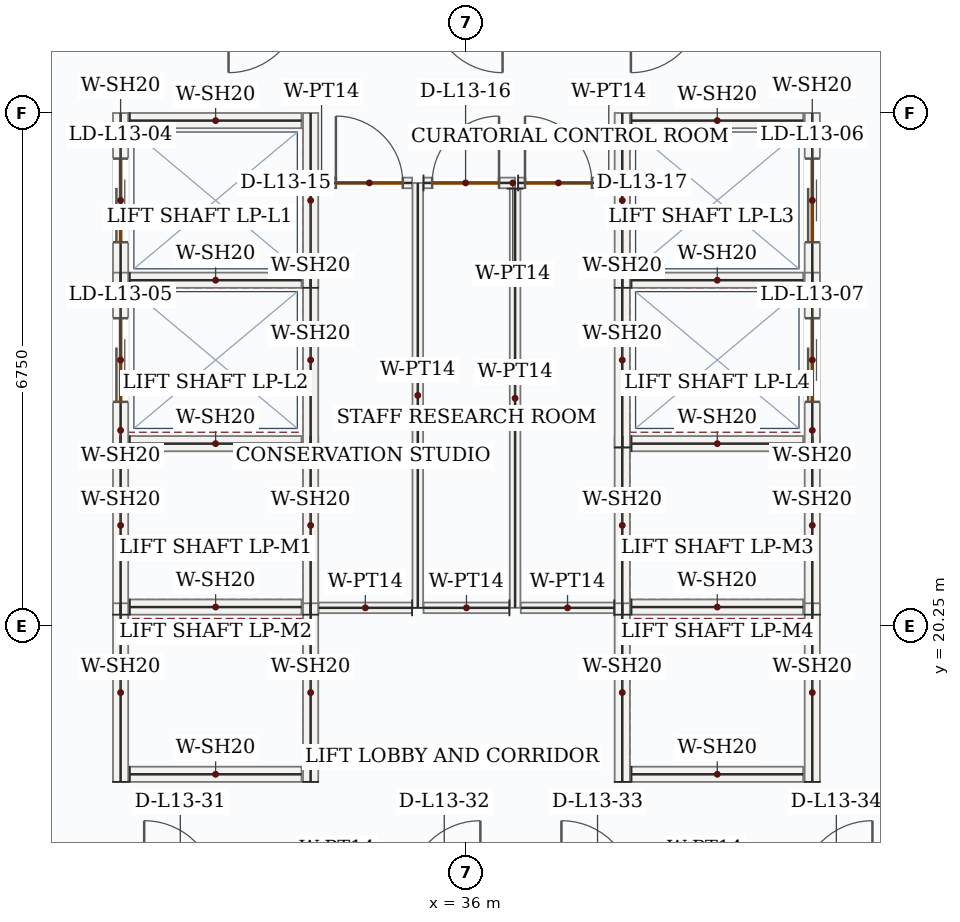
"""IFC4 building model, lengths in metres.
Left out: names, types, materials, properties, quantities, classifications, styles, units other than length and angle.
Written with IfcOpenShell. Run it as: python <this file> out.ifc"""

import sys

from ifc_helpers import new_model, si_unit, direction, frame, frame_2d, origin, place, context, subcontext, project, spatial, rectangle, extrude, source, transform, mapped, element, fill, save


model = new_model("IFC4")
c1 = context("Model", 3, precision=1e-05, world=origin(), true_north=direction((0.0, 1.0)))
c2 = subcontext(c1, "Body", "Model", "MODEL_VIEW")
j1 = project(units=[si_unit("LENGTHUNIT", "METRE"), si_unit("PLANEANGLEUNIT", "RADIAN")], contexts=[c1])
p1 = place(None, origin())
s1 = spatial("IfcSite", under=j1, at=p1, CompositionType="ELEMENT")
p2 = place(p1, origin())
s2 = spatial("IfcBuilding", under=s1, at=p2, CompositionType="ELEMENT")
p3 = place(p2, frame((0.0, 0.0, 62.7)))
s3 = spatial("IfcBuildingStorey", under=s2, at=p3, CompositionType="ELEMENT", Elevation=62.7)
m1 = source(origin(), c2, "Body", "SweptSolid", [
    extrude(rectangle(XDim=2.35, YDim=0.2, at=frame_2d((1.175, 0.0))), origin(), (0.0, 0.0, 1.0), 3.95),
])
for number, where, z_axis, x_axis in (
    (1, (31.45, 20.4, 0.0), (0.0, 0.0, 1.0), (0.0, 1.0, 0.0)),
    (2, (33.95, 20.4, 0.0), (0.0, 0.0, 1.0), (0.0, 1.0, 0.0)),
):
    element("IfcWall", number, at=place(p3, frame(where, z_axis=z_axis, x_axis=x_axis)), inside=s3, PredefinedType="SOLIDWALL", context=c2, shape_type="MappedRepresentation", body=[
        mapped(m1, transform((0.0, 0.0, 0.0), x_axis=(1.0, 0.0, 0.0), y_axis=(0.0, 1.0, 0.0), z_axis=(0.0, 0.0, 1.0), scale=1.0)),
    ])
m2 = source(origin(), c2, "Body", "SweptSolid", [
    extrude(rectangle(XDim=2.26, YDim=0.2, at=frame_2d((1.13, 0.0))), origin(), (0.0, 0.0, 1.0), 3.95),
])
for number, where, z_axis, x_axis in (
    (3, (31.57, 20.5, 0.0), (0.0, 0.0, 1.0), (1.0, 0.0, 0.0)),
    (4, (31.57, 22.65, 0.0), (0.0, 0.0, 1.0), (1.0, 0.0, 0.0)),
):
    element("IfcWall", number, at=place(p3, frame(where, z_axis=z_axis, x_axis=x_axis)), inside=s3, PredefinedType="SOLIDWALL", context=c2, shape_type="MappedRepresentation", body=[
        mapped(m2, transform((0.0, 0.0, 0.0), x_axis=(1.0, 0.0, 0.0), y_axis=(0.0, 1.0, 0.0), z_axis=(0.0, 0.0, 1.0), scale=1.0)),
    ])
for number, where, z_axis, x_axis in (
    (5, (31.45, 18.2, 0.0), (0.0, 0.0, 1.0), (0.0, 1.0, 0.0)),
    (6, (33.95, 18.2, 0.0), (0.0, 0.0, 1.0), (0.0, 1.0, 0.0)),
):
    element("IfcWall", number, at=place(p3, frame(where, z_axis=z_axis, x_axis=x_axis)), inside=s3, PredefinedType="SOLIDWALL", context=c2, shape_type="MappedRepresentation", body=[
        mapped(m1, transform((0.0, 0.0, 0.0), x_axis=(1.0, 0.0, 0.0), y_axis=(0.0, 1.0, 0.0), z_axis=(0.0, 0.0, 1.0), scale=1.0)),
    ])
p4 = place(p3, frame((31.57, 18.3, 0.0), z_axis=(0.0, 0.0, 1.0), x_axis=(1.0, 0.0, 0.0)))
e7 = element("IfcWall", 7, at=p4, inside=s3, PredefinedType="SOLIDWALL", context=c2, shape_type="MappedRepresentation", body=[
    mapped(m2, transform((0.0, 0.0, 0.0), x_axis=(1.0, 0.0, 0.0), y_axis=(0.0, 1.0, 0.0), z_axis=(0.0, 0.0, 1.0), scale=1.0)),
])
for number, where, z_axis, x_axis in (
    (8, (38.05, 20.4, 0.0), (0.0, 0.0, 1.0), (0.0, 1.0, 0.0)),
    (9, (40.55, 20.4, 0.0), (0.0, 0.0, 1.0), (0.0, 1.0, 0.0)),
):
    element("IfcWall", number, at=place(p3, frame(where, z_axis=z_axis, x_axis=x_axis)), inside=s3, PredefinedType="SOLIDWALL", context=c2, shape_type="MappedRepresentation", body=[
        mapped(m1, transform((0.0, 0.0, 0.0), x_axis=(1.0, 0.0, 0.0), y_axis=(0.0, 1.0, 0.0), z_axis=(0.0, 0.0, 1.0), scale=1.0)),
    ])
for number, where, z_axis, x_axis in (
    (10, (38.17, 20.5, 0.0), (0.0, 0.0, 1.0), (1.0, 0.0, 0.0)),
    (11, (38.17, 22.65, 0.0), (0.0, 0.0, 1.0), (1.0, 0.0, 0.0)),
):
    element("IfcWall", number, at=place(p3, frame(where, z_axis=z_axis, x_axis=x_axis)), inside=s3, PredefinedType="SOLIDWALL", context=c2, shape_type="MappedRepresentation", body=[
        mapped(m2, transform((0.0, 0.0, 0.0), x_axis=(1.0, 0.0, 0.0), y_axis=(0.0, 1.0, 0.0), z_axis=(0.0, 0.0, 1.0), scale=1.0)),
    ])
for number, where, z_axis, x_axis in (
    (12, (38.05, 18.2, 0.0), (0.0, 0.0, 1.0), (0.0, 1.0, 0.0)),
    (13, (40.55, 18.2, 0.0), (0.0, 0.0, 1.0), (0.0, 1.0, 0.0)),
):
    element("IfcWall", number, at=place(p3, frame(where, z_axis=z_axis, x_axis=x_axis)), inside=s3, PredefinedType="SOLIDWALL", context=c2, shape_type="MappedRepresentation", body=[
        mapped(m1, transform((0.0, 0.0, 0.0), x_axis=(1.0, 0.0, 0.0), y_axis=(0.0, 1.0, 0.0), z_axis=(0.0, 0.0, 1.0), scale=1.0)),
    ])
p5 = place(p3, frame((38.17, 18.3, 0.0), z_axis=(0.0, 0.0, 1.0), x_axis=(1.0, 0.0, 0.0)))
e14 = element("IfcWall", 14, at=p5, inside=s3, PredefinedType="SOLIDWALL", context=c2, shape_type="MappedRepresentation", body=[
    mapped(m2, transform((0.0, 0.0, 0.0), x_axis=(1.0, 0.0, 0.0), y_axis=(0.0, 1.0, 0.0), z_axis=(0.0, 0.0, 1.0), scale=1.0)),
])
p6 = place(p3, frame((31.45, 24.7, 0.0), z_axis=(0.0, 0.0, 1.0), x_axis=(0.0, 1.0, 0.0)))
e15 = element("IfcWall", 15, at=p6, inside=s3, PredefinedType="SOLIDWALL", context=c2, shape_type="SweptSolid", body=[
    extrude(rectangle(XDim=2.3, YDim=0.2, at=frame_2d((1.15, 0.0))), origin(), (0.0, 0.0, 1.0), 3.95),
])
p7 = place(p6, frame((0.6, 0.0, 0.0)))
e16 = element("IfcOpeningElement", 16, at=p7, cuts=e15, PredefinedType="OPENING", context=c2, shape_type="SweptSolid", body=[
    extrude(rectangle(XDim=1.1, YDim=2.15, at=frame_2d((0.55, 1.075))), frame((0.0, 0.11, 0.0), z_axis=(0.0, -1.0, 0.0), x_axis=(1.0, 0.0, 0.0)), (0.0, 0.0, 1.0), 0.22),
])
m3 = source(origin(), c2, "Body", "SweptSolid", [
    extrude(rectangle(XDim=2.3, YDim=0.2, at=frame_2d((1.15, 0.0))), origin(), (0.0, 0.0, 1.0), 3.95),
])
p8 = place(p3, frame((33.95, 24.7, 0.0), z_axis=(0.0, 0.0, 1.0), x_axis=(0.0, 1.0, 0.0)))
e17 = element("IfcWall", 17, at=p8, inside=s3, PredefinedType="SOLIDWALL", context=c2, shape_type="MappedRepresentation", body=[
    mapped(m3, transform((0.0, 0.0, 0.0), x_axis=(1.0, 0.0, 0.0), y_axis=(0.0, 1.0, 0.0), z_axis=(0.0, 0.0, 1.0), scale=1.0)),
])
for number, where, z_axis, x_axis in (
    (18, (31.57, 24.8, 0.0), (0.0, 0.0, 1.0), (1.0, 0.0, 0.0)),
    (19, (31.57, 26.9, 0.0), (0.0, 0.0, 1.0), (1.0, 0.0, 0.0)),
):
    element("IfcWall", number, at=place(p3, frame(where, z_axis=z_axis, x_axis=x_axis)), inside=s3, PredefinedType="SOLIDWALL", context=c2, shape_type="MappedRepresentation", body=[
        mapped(m2, transform((0.0, 0.0, 0.0), x_axis=(1.0, 0.0, 0.0), y_axis=(0.0, 1.0, 0.0), z_axis=(0.0, 0.0, 1.0), scale=1.0)),
    ])
p9 = place(p3, frame((31.45, 22.6, 0.0), z_axis=(0.0, 0.0, 1.0), x_axis=(0.0, 1.0, 0.0)))
e20 = element("IfcWall", 20, at=p9, inside=s3, PredefinedType="SOLIDWALL", context=c2, shape_type="SweptSolid", body=[
    extrude(rectangle(XDim=2.3, YDim=0.2, at=frame_2d((1.15, 0.0))), origin(), (0.0, 0.0, 1.0), 3.95),
])
p10 = place(p9, frame((0.6, 0.0, 0.0)))
e21 = element("IfcOpeningElement", 21, at=p10, cuts=e20, PredefinedType="OPENING", context=c2, shape_type="SweptSolid", body=[
    extrude(rectangle(XDim=1.1, YDim=2.15, at=frame_2d((0.55, 1.075))), frame((0.0, 0.11, 0.0), z_axis=(0.0, -1.0, 0.0), x_axis=(1.0, 0.0, 0.0)), (0.0, 0.0, 1.0), 0.22),
])
m4 = source(origin(), c2, "Body", "SweptSolid", [
    extrude(rectangle(XDim=2.3, YDim=0.2, at=frame_2d((1.15, 0.0))), origin(), (0.0, 0.0, 1.0), 3.95),
])
p11 = place(p3, frame((33.95, 22.6, 0.0), z_axis=(0.0, 0.0, 1.0), x_axis=(0.0, 1.0, 0.0)))
e22 = element("IfcWall", 22, at=p11, inside=s3, PredefinedType="SOLIDWALL", context=c2, shape_type="MappedRepresentation", body=[
    mapped(m4, transform((0.0, 0.0, 0.0), x_axis=(1.0, 0.0, 0.0), y_axis=(0.0, 1.0, 0.0), z_axis=(0.0, 0.0, 1.0), scale=1.0)),
])
p12 = place(p3, frame((38.05, 24.7, 0.0), z_axis=(0.0, 0.0, 1.0), x_axis=(0.0, 1.0, 0.0)))
e23 = element("IfcWall", 23, at=p12, inside=s3, PredefinedType="SOLIDWALL", context=c2, shape_type="MappedRepresentation", body=[
    mapped(m3, transform((0.0, 0.0, 0.0), x_axis=(1.0, 0.0, 0.0), y_axis=(0.0, 1.0, 0.0), z_axis=(0.0, 0.0, 1.0), scale=1.0)),
])
p13 = place(p3, frame((40.55, 24.7, 0.0), z_axis=(0.0, 0.0, 1.0), x_axis=(0.0, 1.0, 0.0)))
e24 = element("IfcWall", 24, at=p13, inside=s3, PredefinedType="SOLIDWALL", context=c2, shape_type="SweptSolid", body=[
    extrude(rectangle(XDim=2.3, YDim=0.2, at=frame_2d((1.15, 0.0))), origin(), (0.0, 0.0, 1.0), 3.95),
])
p14 = place(p13, frame((0.6, 0.0, 0.0)))
e25 = element("IfcOpeningElement", 25, at=p14, cuts=e24, PredefinedType="OPENING", context=c2, shape_type="SweptSolid", body=[
    extrude(rectangle(XDim=1.1, YDim=2.15, at=frame_2d((0.55, 1.075))), frame((0.0, 0.11, 0.0), z_axis=(0.0, -1.0, 0.0), x_axis=(1.0, 0.0, 0.0)), (0.0, 0.0, 1.0), 0.22),
])
for number, where, z_axis, x_axis in (
    (26, (38.17, 24.8, 0.0), (0.0, 0.0, 1.0), (1.0, 0.0, 0.0)),
    (27, (38.17, 26.9, 0.0), (0.0, 0.0, 1.0), (1.0, 0.0, 0.0)),
):
    element("IfcWall", number, at=place(p3, frame(where, z_axis=z_axis, x_axis=x_axis)), inside=s3, PredefinedType="SOLIDWALL", context=c2, shape_type="MappedRepresentation", body=[
        mapped(m2, transform((0.0, 0.0, 0.0), x_axis=(1.0, 0.0, 0.0), y_axis=(0.0, 1.0, 0.0), z_axis=(0.0, 0.0, 1.0), scale=1.0)),
    ])
p15 = place(p3, frame((38.05, 22.6, 0.0), z_axis=(0.0, 0.0, 1.0), x_axis=(0.0, 1.0, 0.0)))
e28 = element("IfcWall", 28, at=p15, inside=s3, PredefinedType="SOLIDWALL", context=c2, shape_type="MappedRepresentation", body=[
    mapped(m4, transform((0.0, 0.0, 0.0), x_axis=(1.0, 0.0, 0.0), y_axis=(0.0, 1.0, 0.0), z_axis=(0.0, 0.0, 1.0), scale=1.0)),
])
p16 = place(p3, frame((40.55, 22.6, 0.0), z_axis=(0.0, 0.0, 1.0), x_axis=(0.0, 1.0, 0.0)))
e29 = element("IfcWall", 29, at=p16, inside=s3, PredefinedType="SOLIDWALL", context=c2, shape_type="SweptSolid", body=[
    extrude(rectangle(XDim=2.3, YDim=0.2, at=frame_2d((1.15, 0.0))), origin(), (0.0, 0.0, 1.0), 3.95),
])
p17 = place(p16, frame((0.6, 0.0, 0.0)))
e30 = element("IfcOpeningElement", 30, at=p17, cuts=e29, PredefinedType="OPENING", context=c2, shape_type="SweptSolid", body=[
    extrude(rectangle(XDim=1.1, YDim=2.15, at=frame_2d((0.55, 1.075))), frame((0.0, 0.11, 0.0), z_axis=(0.0, -1.0, 0.0), x_axis=(1.0, 0.0, 0.0)), (0.0, 0.0, 1.0), 0.22),
])
m5 = source(origin(), c2, "Body", "SweptSolid", [
    extrude(rectangle(XDim=5.59, YDim=0.14, at=frame_2d((2.795, 0.0))), origin(), (0.0, 0.0, 1.0), 3.95),
])
p18 = place(p3, frame((35.36, 20.49, 0.0), z_axis=(0.0, 0.0, 1.0), x_axis=(0.0, 1.0, 0.0)))
e31 = element("IfcWall", 31, at=p18, inside=s3, PredefinedType="PARTITIONING", context=c2, shape_type="MappedRepresentation", body=[
    mapped(m5, transform((0.0, 0.0, 0.0), x_axis=(1.0, 0.0, 0.0), y_axis=(0.0, 1.0, 0.0), z_axis=(0.0, 0.0, 1.0), scale=1.0)),
])
p19 = place(p3, frame((35.435, 26.08, 0.0), z_axis=(0.0, 0.0, 1.0), x_axis=(1.0, 0.0, 0.0)))
e32 = element("IfcWall", 32, at=p19, inside=s3, PredefinedType="PARTITIONING", context=c2, shape_type="SweptSolid", body=[
    extrude(rectangle(XDim=1.205, YDim=0.14, at=frame_2d((0.603, 0.0))), origin(), (0.0, 0.0, 1.0), 3.95),
])
p20 = place(p19, frame((0.114, 0.0, 0.0)))
e33 = element("IfcOpeningElement", 33, at=p20, cuts=e32, PredefinedType="OPENING", context=c2, shape_type="SweptSolid", body=[
    extrude(rectangle(XDim=0.88, YDim=2.1, at=frame_2d((0.44, 1.05))), frame((0.0, 0.08, 0.0), z_axis=(0.0, -1.0, 0.0), x_axis=(1.0, 0.0, 0.0)), (0.0, 0.0, 1.0), 0.16),
])
m6 = source(origin(), c2, "Body", "SweptSolid", [
    extrude(rectangle(XDim=5.515, YDim=0.14, at=frame_2d((2.757, 0.0))), origin(), (0.0, 0.0, 1.0), 3.95),
])
p21 = place(p3, frame((36.64, 26.005, 0.0), z_axis=(0.0, 0.0, 1.0), x_axis=(0.0, -1.0, 0.0)))
e34 = element("IfcWall", 34, at=p21, inside=s3, PredefinedType="PARTITIONING", context=c2, shape_type="MappedRepresentation", body=[
    mapped(m6, transform((0.0, 0.0, 0.0), x_axis=(1.0, 0.0, 0.0), y_axis=(0.0, 1.0, 0.0), z_axis=(0.0, 0.0, 1.0), scale=1.0)),
])
m7 = source(origin(), c2, "Body", "SweptSolid", [
    extrude(rectangle(XDim=1.13, YDim=0.14, at=frame_2d((0.565, 0.0))), origin(), (0.0, 0.0, 1.0), 3.95),
])
p22 = place(p3, frame((36.565, 20.49, 0.0), z_axis=(0.0, 0.0, 1.0), x_axis=(-1.0, 0.0, 0.0)))
e35 = element("IfcWall", 35, at=p22, inside=s3, PredefinedType="PARTITIONING", context=c2, shape_type="MappedRepresentation", body=[
    mapped(m7, transform((0.0, 0.0, 0.0), x_axis=(1.0, 0.0, 0.0), y_axis=(0.0, 1.0, 0.0), z_axis=(0.0, 0.0, 1.0), scale=1.0)),
])
p23 = place(p3, frame((34.055, 26.08, 0.0), z_axis=(0.0, 0.0, 1.0), x_axis=(1.0, 0.0, 0.0)))
e36 = element("IfcWall", 36, at=p23, inside=s3, PredefinedType="PARTITIONING", context=c2, shape_type="SweptSolid", body=[
    extrude(rectangle(XDim=1.23, YDim=0.14, at=frame_2d((0.615, 0.0))), origin(), (0.0, 0.0, 1.0), 3.95),
])
p24 = place(p23, frame((0.228, 0.0, 0.0)))
e37 = element("IfcOpeningElement", 37, at=p24, cuts=e36, PredefinedType="OPENING", context=c2, shape_type="SweptSolid", body=[
    extrude(rectangle(XDim=0.88, YDim=2.1, at=frame_2d((0.44, 1.05))), frame((0.0, 0.08, 0.0), z_axis=(0.0, -1.0, 0.0), x_axis=(1.0, 0.0, 0.0)), (0.0, 0.0, 1.0), 0.16),
])
m8 = source(origin(), c2, "Body", "SweptSolid", [
    extrude(rectangle(XDim=1.23, YDim=0.14, at=frame_2d((0.615, 0.0))), origin(), (0.0, 0.0, 1.0), 3.95),
])
p25 = place(p3, frame((35.285, 20.49, 0.0), z_axis=(0.0, 0.0, 1.0), x_axis=(-1.0, 0.0, 0.0)))
e38 = element("IfcWall", 38, at=p25, inside=s3, PredefinedType="PARTITIONING", context=c2, shape_type="MappedRepresentation", body=[
    mapped(m8, transform((0.0, 0.0, 0.0), x_axis=(1.0, 0.0, 0.0), y_axis=(0.0, 1.0, 0.0), z_axis=(0.0, 0.0, 1.0), scale=1.0)),
])
p26 = place(p3, frame((36.68, 26.08, 0.0), z_axis=(0.0, 0.0, 1.0), x_axis=(1.0, 0.0, 0.0)))
e39 = element("IfcWall", 39, at=p26, inside=s3, PredefinedType="PARTITIONING", context=c2, shape_type="SweptSolid", body=[
    extrude(rectangle(XDim=1.265, YDim=0.14, at=frame_2d((0.633, 0.0))), origin(), (0.0, 0.0, 1.0), 3.95),
])
p27 = place(p26, frame((0.09, 0.0, 0.0)))
e40 = element("IfcOpeningElement", 40, at=p27, cuts=e39, PredefinedType="OPENING", context=c2, shape_type="SweptSolid", body=[
    extrude(rectangle(XDim=0.88, YDim=2.1, at=frame_2d((0.44, 1.05))), frame((0.0, 0.08, 0.0), z_axis=(0.0, -1.0, 0.0), x_axis=(1.0, 0.0, 0.0)), (0.0, 0.0, 1.0), 0.16),
])
p28 = place(p3, frame((37.945, 20.49, 0.0), z_axis=(0.0, 0.0, 1.0), x_axis=(-1.0, 0.0, 0.0)))
e41 = element("IfcWall", 41, at=p28, inside=s3, PredefinedType="PARTITIONING", context=c2, shape_type="MappedRepresentation", body=[
    mapped(m8, transform((0.0, 0.0, 0.0), x_axis=(1.0, 0.0, 0.0), y_axis=(0.0, 1.0, 0.0), z_axis=(0.0, 0.0, 1.0), scale=1.0)),
])
m9 = source(origin(), c2, "Body", "SweptSolid", [
    extrude(rectangle(XDim=1.1, YDim=2.15, at=frame_2d((0.55, 1.075))), frame((0.0, 0.025, 0.0), z_axis=(0.0, -1.0, 0.0), x_axis=(1.0, 0.0, 0.0)), (0.0, 0.0, 1.0), 0.05),
])
p29 = place(p7, origin())
e42 = element("IfcDoor", 42, at=p29, inside=s3, OperationType="DOUBLE_DOOR_SLIDING", PredefinedType="DOOR", context=c2, shape_type="MappedRepresentation", body=[
    mapped(m9, transform((0.0, 0.0, 0.0), x_axis=(1.0, 0.0, 0.0), y_axis=(0.0, 1.0, 0.0), z_axis=(0.0, 0.0, 1.0), scale=1.0)),
])
fill(e16, e42)
p30 = place(p10, origin())
e43 = element("IfcDoor", 43, at=p30, inside=s3, OperationType="DOUBLE_DOOR_SLIDING", PredefinedType="DOOR", context=c2, shape_type="MappedRepresentation", body=[
    mapped(m9, transform((0.0, 0.0, 0.0), x_axis=(1.0, 0.0, 0.0), y_axis=(0.0, 1.0, 0.0), z_axis=(0.0, 0.0, 1.0), scale=1.0)),
])
fill(e21, e43)
p31 = place(p14, origin())
e44 = element("IfcDoor", 44, at=p31, inside=s3, OperationType="DOUBLE_DOOR_SLIDING", PredefinedType="DOOR", context=c2, shape_type="MappedRepresentation", body=[
    mapped(m9, transform((0.0, 0.0, 0.0), x_axis=(1.0, 0.0, 0.0), y_axis=(0.0, 1.0, 0.0), z_axis=(0.0, 0.0, 1.0), scale=1.0)),
])
fill(e25, e44)
p32 = place(p17, origin())
e45 = element("IfcDoor", 45, at=p32, inside=s3, OperationType="DOUBLE_DOOR_SLIDING", PredefinedType="DOOR", context=c2, shape_type="MappedRepresentation", body=[
    mapped(m9, transform((0.0, 0.0, 0.0), x_axis=(1.0, 0.0, 0.0), y_axis=(0.0, 1.0, 0.0), z_axis=(0.0, 0.0, 1.0), scale=1.0)),
])
fill(e30, e45)
m10 = source(origin(), c2, "Body", "SweptSolid", [
    extrude(rectangle(XDim=0.88, YDim=2.1, at=frame_2d((0.44, 1.05))), frame((0.0, 0.025, 0.0), z_axis=(0.0, -1.0, 0.0), x_axis=(1.0, 0.0, 0.0)), (0.0, 0.0, 1.0), 0.05),
])
p33 = place(p24, origin())
e46 = element("IfcDoor", 46, at=p33, inside=s3, OperationType="SINGLE_SWING_LEFT", PredefinedType="DOOR", context=c2, shape_type="MappedRepresentation", body=[
    mapped(m10, transform((0.0, 0.0, 0.0), x_axis=(1.0, 0.0, 0.0), y_axis=(0.0, 1.0, 0.0), z_axis=(0.0, 0.0, 1.0), scale=1.0)),
])
fill(e37, e46)
p34 = place(p20, origin())
e47 = element("IfcDoor", 47, at=p34, inside=s3, OperationType="SINGLE_SWING_RIGHT", PredefinedType="DOOR", context=c2, shape_type="MappedRepresentation", body=[
    mapped(m10, transform((0.0, 0.0, 0.0), x_axis=(1.0, 0.0, 0.0), y_axis=(0.0, 1.0, 0.0), z_axis=(0.0, 0.0, 1.0), scale=1.0)),
])
fill(e33, e47)
p35 = place(p27, origin())
e48 = element("IfcDoor", 48, at=p35, inside=s3, OperationType="SINGLE_SWING_LEFT", PredefinedType="DOOR", context=c2, shape_type="MappedRepresentation", body=[
    mapped(m10, transform((0.0, 0.0, 0.0), x_axis=(1.0, 0.0, 0.0), y_axis=(0.0, 1.0, 0.0), z_axis=(0.0, 0.0, 1.0), scale=1.0)),
])
fill(e40, e48)
save(model, sys.argv[1])
